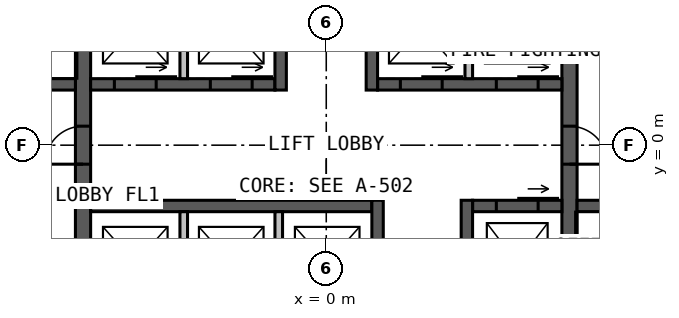
"""IFC4 building model, lengths in metres.
Left out: names, types, materials, properties, quantities, classifications, styles, units other than length and angle.
Written with IfcOpenShell. Run it as: python <this file> out.ifc"""

import sys

from ifc_helpers import new_model, si_unit, direction, frame, frame_2d, origin, place, context, subcontext, project, spatial, rectangle, extrude, element, fill, save


model = new_model("IFC4")
c1 = context("Model", 3, precision=1e-05, world=origin(), true_north=direction((0.0, 1.0)))
c2 = subcontext(c1, "Body", "Model", "MODEL_VIEW")
j1 = project(units=[si_unit("LENGTHUNIT", "METRE"), si_unit("PLANEANGLEUNIT", "RADIAN")], contexts=[c1])
p1 = place(None, origin())
s1 = spatial("IfcSite", under=j1, at=p1, CompositionType="ELEMENT")
p2 = place(p1, origin())
s2 = spatial("IfcBuilding", under=s1, at=p2, CompositionType="ELEMENT")
p3 = place(p2, frame((0.0, 0.0, 37.0)))
s3 = spatial("IfcBuildingStorey", under=s2, at=p3, CompositionType="ELEMENT", Elevation=37.0)
p4 = place(p3, frame((-6.4, -9.2, 0.0), z_axis=(0.0, 0.0, 1.0), x_axis=(0.0, 1.0, 0.0)))
e1 = element("IfcWall", 1, at=p4, inside=s3, PredefinedType="SOLIDWALL", context=c2, shape_type="SweptSolid", body=[
    extrude(rectangle(XDim=18.4, YDim=0.4, at=frame_2d((9.2, 0.0))), origin(), (0.0, 0.0, 1.0), 4.0),
])
p5 = place(p4, frame((8.7, 0.0, 0.0)))
e2 = element("IfcOpeningElement", 2, at=p5, cuts=e1, PredefinedType="OPENING", context=c2, shape_type="SweptSolid", body=[
    extrude(rectangle(XDim=1.0, YDim=2.2, at=frame_2d((0.5, 1.1))), frame((0.0, 0.21, 0.0), z_axis=(0.0, -1.0, 0.0), x_axis=(1.0, 0.0, 0.0)), (0.0, 0.0, 1.0), 0.42),
])
p6 = place(p3, frame((6.4, 9.2, 0.0), z_axis=(0.0, 0.0, 1.0), x_axis=(0.0, -1.0, 0.0)))
e3 = element("IfcWall", 3, at=p6, inside=s3, PredefinedType="SOLIDWALL", context=c2, shape_type="SweptSolid", body=[
    extrude(rectangle(XDim=18.4, YDim=0.4, at=frame_2d((9.2, 0.0))), origin(), (0.0, 0.0, 1.0), 4.0),
])
p7 = place(p6, frame((8.7, 0.0, 0.0)))
e4 = element("IfcOpeningElement", 4, at=p7, cuts=e3, PredefinedType="OPENING", context=c2, shape_type="SweptSolid", body=[
    extrude(rectangle(XDim=1.0, YDim=2.2, at=frame_2d((0.5, 1.1))), frame((0.0, 0.21, 0.0), z_axis=(0.0, -1.0, 0.0), x_axis=(1.0, 0.0, 0.0)), (0.0, 0.0, 1.0), 0.42),
])
p8 = place(p3, frame((-6.2, 1.6, 0.0), z_axis=(0.0, 0.0, 1.0), x_axis=(1.0, 0.0, 0.0)))
e5 = element("IfcWall", 5, at=p8, inside=s3, PredefinedType="SOLIDWALL", context=c2, shape_type="SweptSolid", body=[
    extrude(rectangle(XDim=4.85, YDim=0.3, at=frame_2d((2.425, 0.0))), origin(), (0.0, 0.0, 1.0), 4.0),
])
p9 = place(p8, frame((0.625, 0.0, 0.0)))
e6 = element("IfcOpeningElement", 6, at=p9, cuts=e5, PredefinedType="OPENING", context=c2, shape_type="SweptSolid", body=[
    extrude(rectangle(XDim=1.1, YDim=2.2, at=frame_2d((0.55, 1.1))), frame((0.0, 0.16, 0.0), z_axis=(0.0, -1.0, 0.0), x_axis=(1.0, 0.0, 0.0)), (0.0, 0.0, 1.0), 0.32),
])
p10 = place(p8, frame((3.15, 0.0, 0.0)))
e7 = element("IfcOpeningElement", 7, at=p10, cuts=e5, PredefinedType="OPENING", context=c2, shape_type="SweptSolid", body=[
    extrude(rectangle(XDim=1.1, YDim=2.2, at=frame_2d((0.55, 1.1))), frame((0.0, 0.16, 0.0), z_axis=(0.0, -1.0, 0.0), x_axis=(1.0, 0.0, 0.0)), (0.0, 0.0, 1.0), 0.32),
])
p11 = place(p3, frame((1.35, 1.6, 0.0), z_axis=(0.0, 0.0, 1.0), x_axis=(1.0, 0.0, 0.0)))
e8 = element("IfcWall", 8, at=p11, inside=s3, PredefinedType="SOLIDWALL", context=c2, shape_type="SweptSolid", body=[
    extrude(rectangle(XDim=4.85, YDim=0.3, at=frame_2d((2.425, 0.0))), origin(), (0.0, 0.0, 1.0), 4.0),
])
p12 = place(p11, frame((0.6, 0.0, 0.0)))
e9 = element("IfcOpeningElement", 9, at=p12, cuts=e8, PredefinedType="OPENING", context=c2, shape_type="SweptSolid", body=[
    extrude(rectangle(XDim=1.1, YDim=2.2, at=frame_2d((0.55, 1.1))), frame((0.0, 0.16, 0.0), z_axis=(0.0, -1.0, 0.0), x_axis=(1.0, 0.0, 0.0)), (0.0, 0.0, 1.0), 0.32),
])
p13 = place(p11, frame((3.125, 0.0, 0.0)))
e10 = element("IfcOpeningElement", 10, at=p13, cuts=e8, PredefinedType="OPENING", context=c2, shape_type="SweptSolid", body=[
    extrude(rectangle(XDim=1.1, YDim=2.2, at=frame_2d((0.55, 1.1))), frame((0.0, 0.16, 0.0), z_axis=(0.0, -1.0, 0.0), x_axis=(1.0, 0.0, 0.0)), (0.0, 0.0, 1.0), 0.32),
])
p14 = place(p3, frame((-1.2, 1.45, 0.0), z_axis=(0.0, 0.0, 1.0), x_axis=(0.0, 1.0, 0.0)))
e11 = element("IfcWall", 11, at=p14, inside=s3, PredefinedType="SOLIDWALL", context=c2, shape_type="SweptSolid", body=[
    extrude(rectangle(XDim=7.75, YDim=0.3, at=frame_2d((3.875, 0.0))), origin(), (0.0, 0.0, 1.0), 4.0),
])
p15 = place(p14, frame((5.05, 0.0, 0.0)))
e12 = element("IfcOpeningElement", 12, at=p15, cuts=e11, PredefinedType="OPENING", context=c2, shape_type="SweptSolid", body=[
    extrude(rectangle(XDim=1.0, YDim=2.2, at=frame_2d((0.5, 1.1))), frame((0.0, 0.16, 0.0), z_axis=(0.0, -1.0, 0.0), x_axis=(1.0, 0.0, 0.0)), (0.0, 0.0, 1.0), 0.32),
])
p16 = place(p3, frame((1.2, 1.45, 0.0), z_axis=(0.0, 0.0, 1.0), x_axis=(0.0, 1.0, 0.0)))
e13 = element("IfcWall", 13, at=p16, inside=s3, PredefinedType="SOLIDWALL", context=c2, shape_type="SweptSolid", body=[
    extrude(rectangle(XDim=7.75, YDim=0.3, at=frame_2d((3.875, 0.0))), origin(), (0.0, 0.0, 1.0), 4.0),
])
p17 = place(p16, frame((3.8, 0.0, 0.0)))
e14 = element("IfcOpeningElement", 14, at=p17, cuts=e13, PredefinedType="OPENING", context=c2, shape_type="SweptSolid", body=[
    extrude(rectangle(XDim=1.0, YDim=2.2, at=frame_2d((0.5, 1.1))), frame((0.0, 0.16, 0.0), z_axis=(0.0, -1.0, 0.0), x_axis=(1.0, 0.0, 0.0)), (0.0, 0.0, 1.0), 0.32),
])
p18 = place(p16, frame((6.15, 0.0, 0.0)))
e15 = element("IfcOpeningElement", 15, at=p18, cuts=e13, PredefinedType="OPENING", context=c2, shape_type="SweptSolid", body=[
    extrude(rectangle(XDim=1.0, YDim=2.2, at=frame_2d((0.5, 1.1))), frame((0.0, 0.16, 0.0), z_axis=(0.0, -1.0, 0.0), x_axis=(1.0, 0.0, 0.0)), (0.0, 0.0, 1.0), 0.32),
])
p19 = place(p3, frame((-6.2, -1.6, 0.0), z_axis=(0.0, 0.0, 1.0), x_axis=(1.0, 0.0, 0.0)))
e16 = element("IfcWall", 16, at=p19, inside=s3, PredefinedType="SOLIDWALL", context=c2, shape_type="SweptSolid", body=[
    extrude(rectangle(XDim=7.4, YDim=0.3, at=frame_2d((3.7, 0.0))), origin(), (0.0, 0.0, 1.0), 4.0),
])
p20 = place(p3, frame((3.85, -1.6, 0.0), z_axis=(0.0, 0.0, 1.0), x_axis=(1.0, 0.0, 0.0)))
e17 = element("IfcWall", 17, at=p20, inside=s3, PredefinedType="SOLIDWALL", context=c2, shape_type="SweptSolid", body=[
    extrude(rectangle(XDim=2.35, YDim=0.3, at=frame_2d((1.175, 0.0))), origin(), (0.0, 0.0, 1.0), 4.0),
])
p21 = place(p20, frame((0.625, 0.0, 0.0)))
e18 = element("IfcOpeningElement", 18, at=p21, cuts=e17, PredefinedType="OPENING", context=c2, shape_type="SweptSolid", body=[
    extrude(rectangle(XDim=1.1, YDim=2.2, at=frame_2d((0.55, 1.1))), frame((0.0, 0.16, 0.0), z_axis=(0.0, -1.0, 0.0), x_axis=(1.0, 0.0, 0.0)), (0.0, 0.0, 1.0), 0.32),
])
p22 = place(p3, frame((1.35, -1.45, 0.0), z_axis=(0.0, 0.0, 1.0), x_axis=(0.0, -1.0, 0.0)))
e19 = element("IfcWall", 19, at=p22, inside=s3, PredefinedType="SOLIDWALL", context=c2, shape_type="SweptSolid", body=[
    extrude(rectangle(XDim=7.75, YDim=0.3, at=frame_2d((3.875, 0.0))), origin(), (0.0, 0.0, 1.0), 4.0),
])
p23 = place(p22, frame((5.8, 0.0, 0.0)))
e20 = element("IfcOpeningElement", 20, at=p23, cuts=e19, PredefinedType="OPENING", context=c2, shape_type="SweptSolid", body=[
    extrude(rectangle(XDim=1.0, YDim=2.2, at=frame_2d((0.5, 1.1))), frame((0.0, 0.16, 0.0), z_axis=(0.0, -1.0, 0.0), x_axis=(1.0, 0.0, 0.0)), (0.0, 0.0, 1.0), 0.32),
])
p24 = place(p22, frame((3.525, 0.0, 0.0)))
e21 = element("IfcOpeningElement", 21, at=p24, cuts=e19, PredefinedType="OPENING", context=c2, shape_type="SweptSolid", body=[
    extrude(rectangle(XDim=0.9, YDim=2.2, at=frame_2d((0.45, 1.1))), frame((0.0, 0.16, 0.0), z_axis=(0.0, -1.0, 0.0), x_axis=(1.0, 0.0, 0.0)), (0.0, 0.0, 1.0), 0.32),
])
p25 = place(p3, frame((3.7, -1.45, 0.0), z_axis=(0.0, 0.0, 1.0), x_axis=(0.0, -1.0, 0.0)))
e22 = element("IfcWall", 22, at=p25, inside=s3, PredefinedType="SOLIDWALL", context=c2, shape_type="SweptSolid", body=[
    extrude(rectangle(XDim=7.75, YDim=0.3, at=frame_2d((3.875, 0.0))), origin(), (0.0, 0.0, 1.0), 4.0),
])
p26 = place(p25, frame((5.1, 0.0, 0.0)))
e23 = element("IfcOpeningElement", 23, at=p26, cuts=e22, PredefinedType="OPENING", context=c2, shape_type="SweptSolid", body=[
    extrude(rectangle(XDim=0.9, YDim=2.2, at=frame_2d((0.45, 1.1))), frame((0.0, 0.16, 0.0), z_axis=(0.0, -1.0, 0.0), x_axis=(1.0, 0.0, 0.0)), (0.0, 0.0, 1.0), 0.32),
])
p27 = place(p3, frame((-9.2, 1.6, 0.0), z_axis=(0.0, 0.0, 1.0), x_axis=(1.0, 0.0, 0.0)))
e24 = element("IfcWall", 24, at=p27, inside=s3, PredefinedType="SOLIDWALL", context=c2, shape_type="SweptSolid", body=[
    extrude(rectangle(XDim=2.6, YDim=0.3, at=frame_2d((1.3, 0.0))), origin(), (0.0, 0.0, 1.0), 4.0),
])
p28 = place(p27, frame((0.8, 0.0, 0.0)))
e25 = element("IfcOpeningElement", 25, at=p28, cuts=e24, PredefinedType="OPENING", context=c2, shape_type="SweptSolid", body=[
    extrude(rectangle(XDim=1.0, YDim=2.2, at=frame_2d((0.5, 1.1))), frame((0.0, 0.16, 0.0), z_axis=(0.0, -1.0, 0.0), x_axis=(1.0, 0.0, 0.0)), (0.0, 0.0, 1.0), 0.32),
])
p29 = place(p3, frame((6.6, -1.6, 0.0), z_axis=(0.0, 0.0, 1.0), x_axis=(1.0, 0.0, 0.0)))
e26 = element("IfcWall", 26, at=p29, inside=s3, PredefinedType="SOLIDWALL", context=c2, shape_type="SweptSolid", body=[
    extrude(rectangle(XDim=2.6, YDim=0.3, at=frame_2d((1.3, 0.0))), origin(), (0.0, 0.0, 1.0), 4.0),
])
p30 = place(p29, frame((0.8, 0.0, 0.0)))
e27 = element("IfcOpeningElement", 27, at=p30, cuts=e26, PredefinedType="OPENING", context=c2, shape_type="SweptSolid", body=[
    extrude(rectangle(XDim=1.0, YDim=2.2, at=frame_2d((0.5, 1.1))), frame((0.0, 0.16, 0.0), z_axis=(0.0, -1.0, 0.0), x_axis=(1.0, 0.0, 0.0)), (0.0, 0.0, 1.0), 0.32),
])
for number, where, z_axis, x_axis in (
    (28, (-3.75, 1.75, 0.0), (0.0, 0.0, 1.0), (0.0, 1.0, 0.0)),
    (29, (3.75, 1.75, 0.0), (0.0, 0.0, 1.0), (0.0, 1.0, 0.0)),
    (30, (-3.75, -1.75, 0.0), (0.0, 0.0, 1.0), (0.0, -1.0, 0.0)),
    (31, (-1.25, -1.75, 0.0), (0.0, 0.0, 1.0), (0.0, -1.0, 0.0)),
):
    element("IfcWall", number, at=place(p3, frame(where, z_axis=z_axis, x_axis=x_axis)), inside=s3, PredefinedType="SOLIDWALL", context=c2, shape_type="SweptSolid", body=[
        extrude(rectangle(XDim=2.7, YDim=0.2, at=frame_2d((1.35, 0.0))), origin(), (0.0, 0.0, 1.0), 3.75),
    ])
p31 = place(p5, origin())
e32 = element("IfcDoor", 32, at=p31, inside=s3, OperationType="SINGLE_SWING_LEFT", PredefinedType="DOOR", context=c2, shape_type="SweptSolid", body=[
    extrude(rectangle(XDim=1.0, YDim=2.2, at=frame_2d((0.5, 1.1))), frame((0.0, 0.025, 0.0), z_axis=(0.0, -1.0, 0.0), x_axis=(1.0, 0.0, 0.0)), (0.0, 0.0, 1.0), 0.05),
])
fill(e2, e32)
p32 = place(p7, origin())
e33 = element("IfcDoor", 33, at=p32, inside=s3, OperationType="SINGLE_SWING_RIGHT", PredefinedType="DOOR", context=c2, shape_type="SweptSolid", body=[
    extrude(rectangle(XDim=1.0, YDim=2.2, at=frame_2d((0.5, 1.1))), frame((0.0, 0.025, 0.0), z_axis=(0.0, -1.0, 0.0), x_axis=(1.0, 0.0, 0.0)), (0.0, 0.0, 1.0), 0.05),
])
fill(e4, e33)
p33 = place(p9, origin())
e34 = element("IfcDoor", 34, at=p33, inside=s3, OperationType="SLIDING_TO_LEFT", PredefinedType="DOOR", context=c2, shape_type="SweptSolid", body=[
    extrude(rectangle(XDim=1.1, YDim=2.2, at=frame_2d((0.55, 1.1))), frame((0.0, 0.025, 0.0), z_axis=(0.0, -1.0, 0.0), x_axis=(1.0, 0.0, 0.0)), (0.0, 0.0, 1.0), 0.05),
])
fill(e6, e34)
p34 = place(p10, origin())
e35 = element("IfcDoor", 35, at=p34, inside=s3, OperationType="SLIDING_TO_LEFT", PredefinedType="DOOR", context=c2, shape_type="SweptSolid", body=[
    extrude(rectangle(XDim=1.1, YDim=2.2, at=frame_2d((0.55, 1.1))), frame((0.0, 0.025, 0.0), z_axis=(0.0, -1.0, 0.0), x_axis=(1.0, 0.0, 0.0)), (0.0, 0.0, 1.0), 0.05),
])
fill(e7, e35)
p35 = place(p12, origin())
e36 = element("IfcDoor", 36, at=p35, inside=s3, OperationType="SLIDING_TO_LEFT", PredefinedType="DOOR", context=c2, shape_type="SweptSolid", body=[
    extrude(rectangle(XDim=1.1, YDim=2.2, at=frame_2d((0.55, 1.1))), frame((0.0, 0.025, 0.0), z_axis=(0.0, -1.0, 0.0), x_axis=(1.0, 0.0, 0.0)), (0.0, 0.0, 1.0), 0.05),
])
fill(e9, e36)
p36 = place(p13, origin())
e37 = element("IfcDoor", 37, at=p36, inside=s3, OperationType="SLIDING_TO_LEFT", PredefinedType="DOOR", context=c2, shape_type="SweptSolid", body=[
    extrude(rectangle(XDim=1.1, YDim=2.2, at=frame_2d((0.55, 1.1))), frame((0.0, 0.025, 0.0), z_axis=(0.0, -1.0, 0.0), x_axis=(1.0, 0.0, 0.0)), (0.0, 0.0, 1.0), 0.05),
])
fill(e10, e37)
p37 = place(p21, origin())
e38 = element("IfcDoor", 38, at=p37, inside=s3, OperationType="SLIDING_TO_LEFT", PredefinedType="DOOR", context=c2, shape_type="SweptSolid", body=[
    extrude(rectangle(XDim=1.1, YDim=2.2, at=frame_2d((0.55, 1.1))), frame((0.0, 0.025, 0.0), z_axis=(0.0, -1.0, 0.0), x_axis=(1.0, 0.0, 0.0)), (0.0, 0.0, 1.0), 0.05),
])
fill(e18, e38)
save(model, sys.argv[1])
